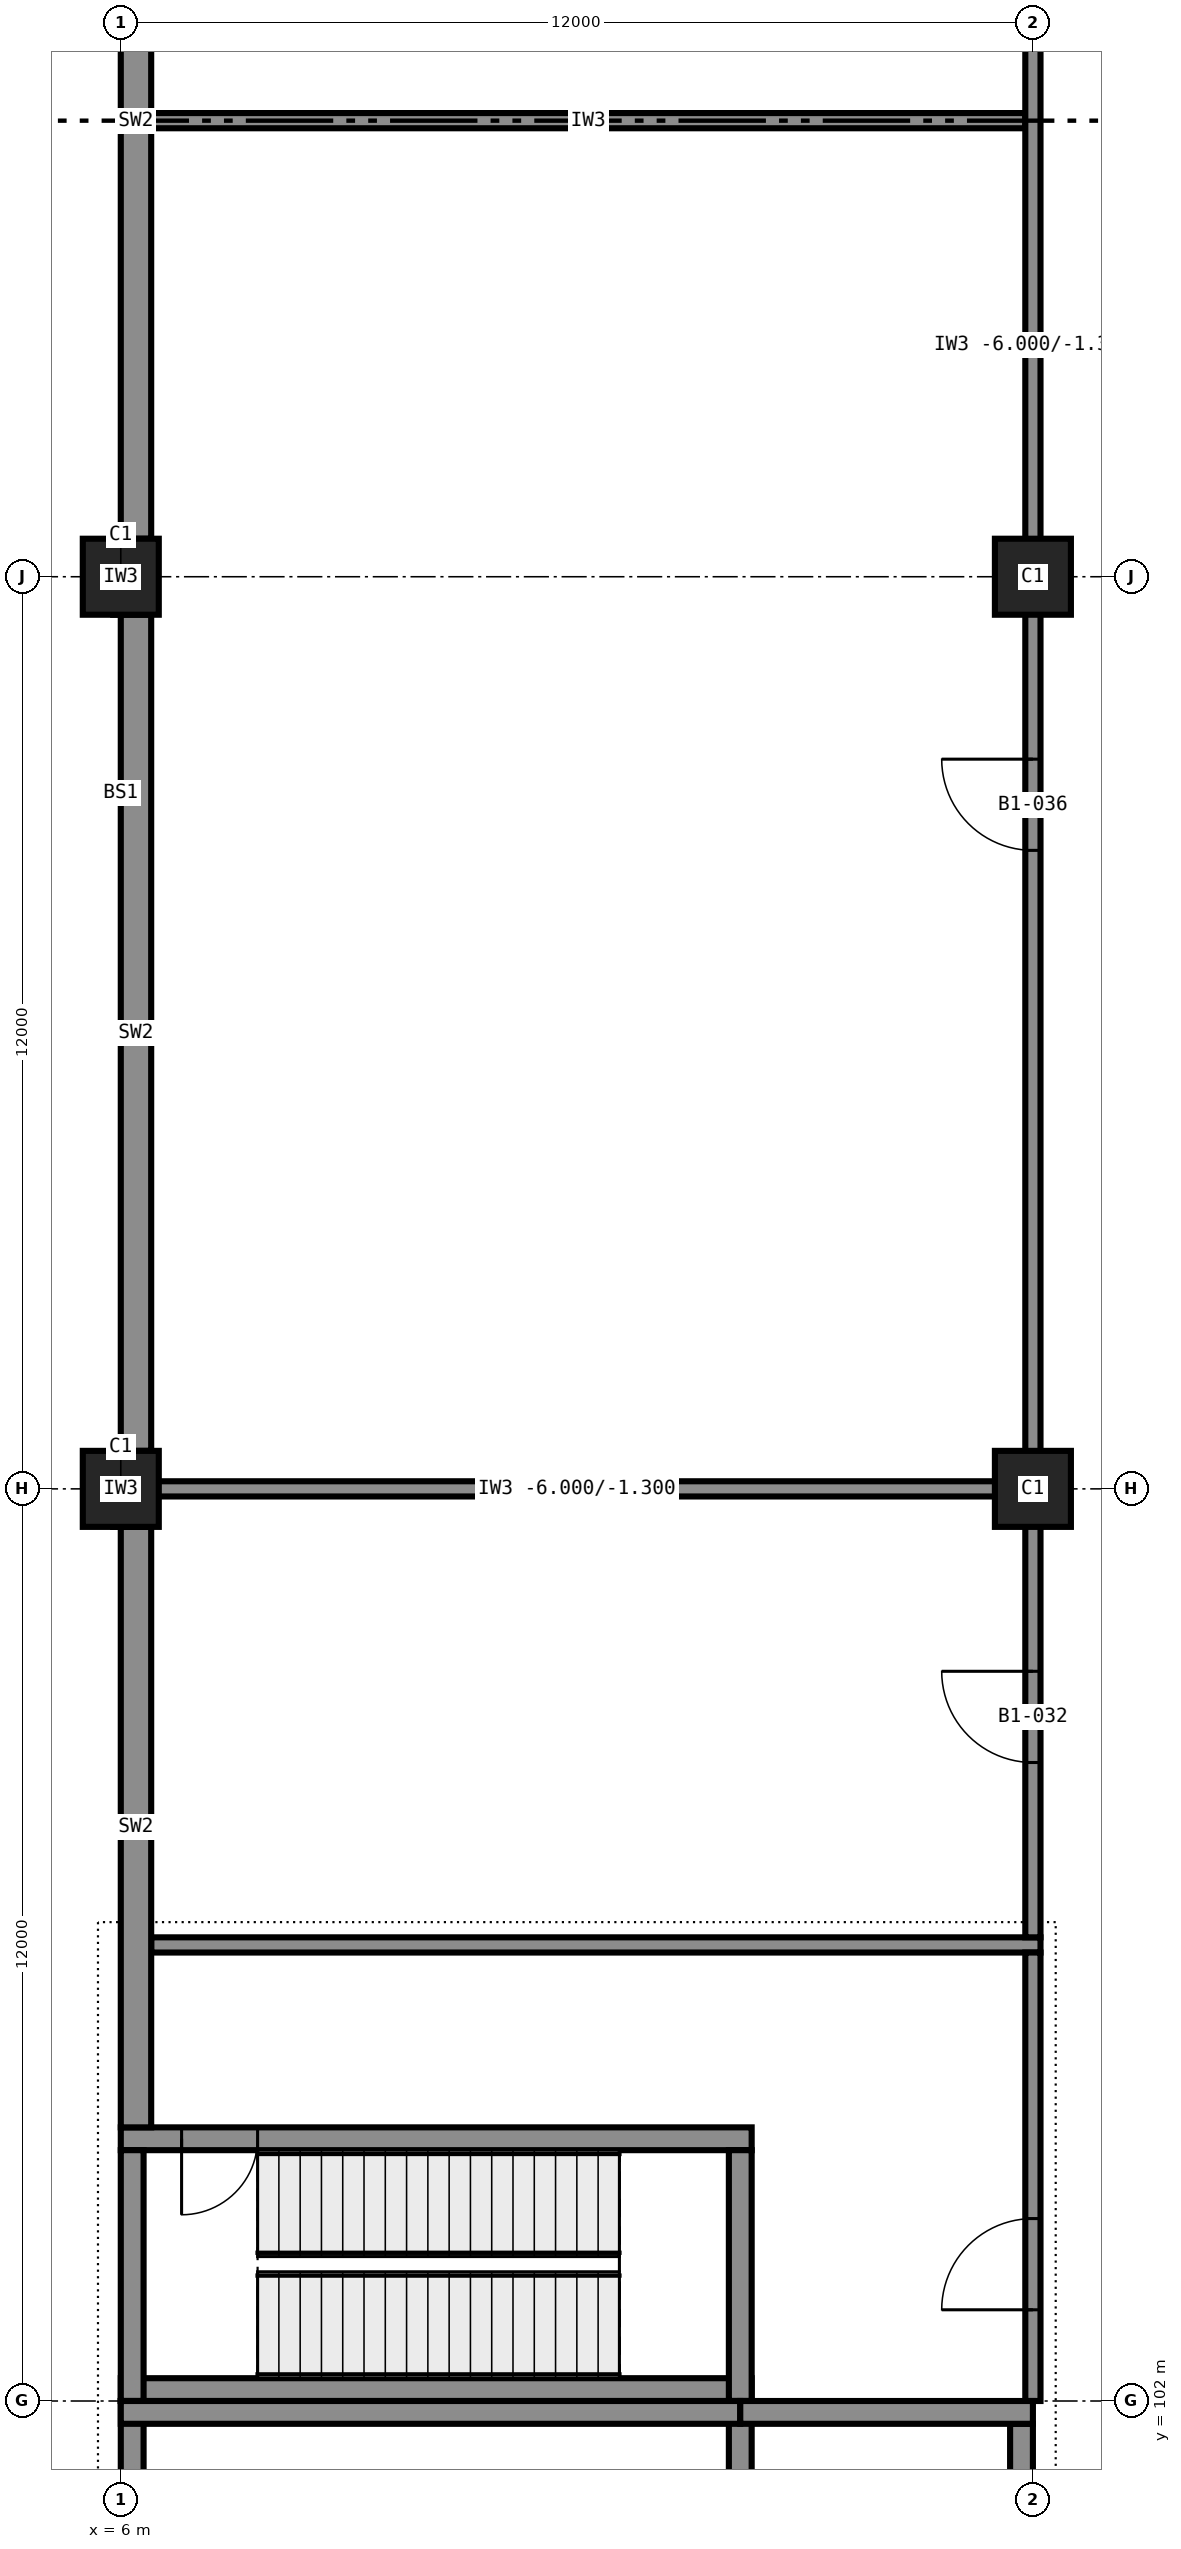
"""IFC4 building model, lengths in metres.
Left out: names, types, materials, properties, quantities, classifications, styles, units other than length and angle.
Written with IfcOpenShell. Run it as: python <this file> out.ifc"""

import sys

from ifc_helpers import new_model, si_unit, direction, frame, frame_2d, origin, origin_2d, place, context, subcontext, project, spatial, rectangle, extrude, element, fill, save


model = new_model("IFC4")
c1 = context("Model", 3, precision=1e-05, world=origin(), true_north=direction((0.0, 1.0)))
c2 = subcontext(c1, "Body", "Model", "MODEL_VIEW")
j1 = project(units=[si_unit("LENGTHUNIT", "METRE"), si_unit("PLANEANGLEUNIT", "RADIAN")], contexts=[c1])
p1 = place(None, origin())
s1 = spatial("IfcSite", under=j1, at=p1, CompositionType="ELEMENT")
p2 = place(p1, origin())
s2 = spatial("IfcBuilding", under=s1, at=p2, CompositionType="ELEMENT")
p3 = place(p2, frame((0.0, 0.0, -6.0)))
s3 = spatial("IfcBuildingStorey", under=s2, at=p3, CompositionType="ELEMENT", Elevation=-6.0)
for number, where, z_axis, x_axis in (
    (1, (6.0, 114.0, -0.4), (0.0, 0.0, 1.0), (1.0, 0.0, 0.0)),
    (2, (6.0, 126.0, -0.4), (0.0, 0.0, 1.0), (1.0, 0.0, 0.0)),
    (3, (18.0, 114.0, -0.4), (0.0, 0.0, 1.0), (1.0, 0.0, 0.0)),
    (4, (18.0, 126.0, -0.4), (0.0, 0.0, 1.0), (1.0, 0.0, 0.0)),
):
    element("IfcColumn", number, at=place(p3, frame(where, z_axis=z_axis, x_axis=x_axis)), inside=s3, PredefinedType="COLUMN", context=c2, shape_type="SweptSolid", body=[
        extrude(rectangle(XDim=1.0, YDim=1.0, at=origin_2d()), origin(), (0.0, 0.0, 1.0), 6.4),
    ])
p4 = place(p3, frame((6.0, 102.15, 0.0), z_axis=(0.0, 0.0, 1.0), x_axis=(1.0, 0.0, 0.0)))
e5 = element("IfcWall", 5, at=p4, inside=s3, PredefinedType="SHEAR", context=c2, shape_type="SweptSolid", body=[
    extrude(rectangle(XDim=8.3, YDim=0.3, at=frame_2d((4.15, 0.0))), origin(), (0.0, 0.0, 1.0), 5.7),
])
p5 = place(p3, frame((6.0, 105.45, 0.0), z_axis=(0.0, 0.0, 1.0), x_axis=(1.0, 0.0, 0.0)))
e6 = element("IfcWall", 6, at=p5, inside=s3, PredefinedType="SHEAR", context=c2, shape_type="SweptSolid", body=[
    extrude(rectangle(XDim=8.3, YDim=0.3, at=frame_2d((4.15, 0.0))), origin(), (0.0, 0.0, 1.0), 5.7),
])
p6 = place(p5, frame((0.8, 0.0, 0.0)))
e7 = element("IfcOpeningElement", 7, at=p6, cuts=e6, PredefinedType="OPENING", context=c2, shape_type="SweptSolid", body=[
    extrude(rectangle(XDim=1.0, YDim=2.1, at=frame_2d((0.5, 1.05))), frame((0.0, 0.16, 0.0), z_axis=(0.0, -1.0, 0.0), x_axis=(1.0, 0.0, 0.0)), (0.0, 0.0, 1.0), 0.32),
])
for number, where, z_axis, x_axis in (
    (8, (6.15, 102.0, 0.0), (0.0, 0.0, 1.0), (0.0, 1.0, 0.0)),
    (9, (14.15, 102.0, 0.0), (0.0, 0.0, 1.0), (0.0, 1.0, 0.0)),
):
    element("IfcWall", number, at=place(p3, frame(where, z_axis=z_axis, x_axis=x_axis)), inside=s3, PredefinedType="SHEAR", context=c2, shape_type="SweptSolid", body=[
        extrude(rectangle(XDim=3.3, YDim=0.3, at=frame_2d((1.65, 0.0))), origin(), (0.0, 0.0, 1.0), 5.7),
    ])
p7 = place(p3, frame((6.0, 101.85, 0.0), z_axis=(0.0, 0.0, 1.0), x_axis=(1.0, 0.0, 0.0)))
e10 = element("IfcWall", 10, at=p7, inside=s3, PredefinedType="SHEAR", context=c2, shape_type="SweptSolid", body=[
    extrude(rectangle(XDim=8.15, YDim=0.3, at=frame_2d((4.075, 0.0))), origin(), (0.0, 0.0, 1.0), 5.7),
])
p8 = place(p3, frame((14.15, 101.85, 0.0), z_axis=(0.0, 0.0, 1.0), x_axis=(1.0, 0.0, 0.0)))
e11 = element("IfcWall", 11, at=p8, inside=s3, PredefinedType="SHEAR", context=c2, shape_type="SweptSolid", body=[
    extrude(rectangle(XDim=3.85, YDim=0.3, at=frame_2d((1.925, 0.0))), origin(), (0.0, 0.0, 1.0), 5.7),
])
p9 = place(p3, frame((6.15, 98.55, 0.0), z_axis=(0.0, 0.0, 1.0), x_axis=(0.0, 1.0, 0.0)))
e12 = element("IfcWall", 12, at=p9, inside=s3, PredefinedType="SHEAR", context=c2, shape_type="SweptSolid", body=[
    extrude(rectangle(XDim=3.45, YDim=0.3, at=frame_2d((1.725, 0.0))), origin(), (0.0, 0.0, 1.0), 5.7),
])
p10 = place(p3, frame((17.85, 98.55, 0.0), z_axis=(0.0, 0.0, 1.0), x_axis=(0.0, 1.0, 0.0)))
e13 = element("IfcWall", 13, at=p10, inside=s3, PredefinedType="SHEAR", context=c2, shape_type="SweptSolid", body=[
    extrude(rectangle(XDim=3.15, YDim=0.3, at=frame_2d((1.575, 0.0))), origin(), (0.0, 0.0, 1.0), 5.7),
])
p11 = place(p10, frame((1.15, 0.0, 0.0)))
e14 = element("IfcOpeningElement", 14, at=p11, cuts=e13, PredefinedType="OPENING", context=c2, shape_type="SweptSolid", body=[
    extrude(rectangle(XDim=1.0, YDim=2.1, at=frame_2d((0.5, 1.05))), frame((0.0, 0.16, 0.0), z_axis=(0.0, -1.0, 0.0), x_axis=(1.0, 0.0, 0.0)), (0.0, 0.0, 1.0), 0.32),
])
p12 = place(p3, frame((14.15, 98.7, 0.0), z_axis=(0.0, 0.0, 1.0), x_axis=(0.0, 1.0, 0.0)))
e15 = element("IfcWall", 15, at=p12, inside=s3, PredefinedType="SHEAR", context=c2, shape_type="SweptSolid", body=[
    extrude(rectangle(XDim=3.3, YDim=0.3, at=frame_2d((1.65, 0.0))), origin(), (0.0, 0.0, 1.0), 5.7),
])
p13 = place(p3, frame((6.2, 105.6, 0.0), z_axis=(0.0, 0.0, 1.0), x_axis=(0.0, 1.0, 0.0)))
e16 = element("IfcWall", 16, at=p13, inside=s3, PredefinedType="SOLIDWALL", context=c2, shape_type="SweptSolid", body=[
    extrude(rectangle(XDim=7.9, YDim=0.4, at=frame_2d((3.95, 0.0))), origin(), (0.0, 0.0, 1.0), 5.7),
])
for number, where, z_axis, x_axis in (
    (17, (6.2, 114.5, 0.0), (0.0, 0.0, 1.0), (0.0, 1.0, 0.0)),
    (18, (6.2, 126.5, 0.0), (0.0, 0.0, 1.0), (0.0, 1.0, 0.0)),
):
    element("IfcWall", number, at=place(p3, frame(where, z_axis=z_axis, x_axis=x_axis)), inside=s3, PredefinedType="SOLIDWALL", context=c2, shape_type="SweptSolid", body=[
        extrude(rectangle(XDim=11.0, YDim=0.4, at=frame_2d((5.5, 0.0))), origin(), (0.0, 0.0, 1.0), 5.7),
    ])
p14 = place(p3, frame((6.4, 108.0, 0.0), z_axis=(0.0, 0.0, 1.0), x_axis=(1.0, 0.0, 0.0)))
e19 = element("IfcWall", 19, at=p14, inside=s3, PredefinedType="PARTITIONING", context=c2, shape_type="SweptSolid", body=[
    extrude(rectangle(XDim=11.7, YDim=0.2, at=frame_2d((5.85, 0.0))), origin(), (0.0, 0.0, 1.0), 5.7),
])
p15 = place(p3, frame((6.1, 114.0, 0.0), z_axis=(0.0, 0.0, 1.0), x_axis=(1.0, 0.0, 0.0)))
e20 = element("IfcWall", 20, at=p15, inside=s3, PredefinedType="PARTITIONING", context=c2, shape_type="SweptSolid", body=[
    extrude(rectangle(XDim=11.8, YDim=0.2, at=frame_2d((5.9, 0.0))), origin(), (0.0, 0.0, 1.0), 4.7),
])
p16 = place(p3, frame((6.4, 132.0, 0.0), z_axis=(0.0, 0.0, 1.0), x_axis=(1.0, 0.0, 0.0)))
e21 = element("IfcWall", 21, at=p16, inside=s3, PredefinedType="PARTITIONING", context=c2, shape_type="SweptSolid", body=[
    extrude(rectangle(XDim=11.5, YDim=0.2, at=frame_2d((5.75, 0.0))), origin(), (0.0, 0.0, 1.0), 5.7),
])
for number, where, z_axis, x_axis in (
    (22, (6.0, 113.5, 0.0), (0.0, 0.0, 1.0), (0.0, 1.0, 0.0)),
    (23, (6.0, 125.5, 0.0), (0.0, 0.0, 1.0), (0.0, 1.0, 0.0)),
):
    element("IfcWall", number, at=place(p3, frame(where, z_axis=z_axis, x_axis=x_axis)), inside=s3, PredefinedType="PARTITIONING", context=c2, shape_type="SweptSolid", body=[
        extrude(rectangle(XDim=1.0, YDim=0.2, at=frame_2d((0.5, 0.0))), origin(), (0.0, 0.0, 1.0), 5.7),
    ])
p17 = place(p3, frame((18.0, 102.0, 0.0), z_axis=(0.0, 0.0, 1.0), x_axis=(0.0, 1.0, 0.0)))
e24 = element("IfcWall", 24, at=p17, inside=s3, PredefinedType="PARTITIONING", context=c2, shape_type="SweptSolid", body=[
    extrude(rectangle(XDim=5.9, YDim=0.2, at=frame_2d((2.95, 0.0))), origin(), (0.0, 0.0, 1.0), 4.7),
])
p18 = place(p17, frame((1.2, 0.0, 0.0)))
e25 = element("IfcOpeningElement", 25, at=p18, cuts=e24, PredefinedType="OPENING", context=c2, shape_type="SweptSolid", body=[
    extrude(rectangle(XDim=1.2, YDim=2.1, at=frame_2d((0.6, 1.05))), frame((0.0, 0.11, 0.0), z_axis=(0.0, -1.0, 0.0), x_axis=(1.0, 0.0, 0.0)), (0.0, 0.0, 1.0), 0.22),
])
p19 = place(p3, frame((18.0, 108.1, 0.0), z_axis=(0.0, 0.0, 1.0), x_axis=(0.0, 1.0, 0.0)))
e26 = element("IfcWall", 26, at=p19, inside=s3, PredefinedType="PARTITIONING", context=c2, shape_type="SweptSolid", body=[
    extrude(rectangle(XDim=41.9, YDim=0.2, at=frame_2d((20.95, 0.0))), origin(), (0.0, 0.0, 1.0), 4.7),
])
p20 = place(p19, frame((2.3, 0.0, 0.0)))
e27 = element("IfcOpeningElement", 27, at=p20, cuts=e26, PredefinedType="OPENING", context=c2, shape_type="SweptSolid", body=[
    extrude(rectangle(XDim=1.2, YDim=2.1, at=frame_2d((0.6, 1.05))), frame((0.0, 0.11, 0.0), z_axis=(0.0, -1.0, 0.0), x_axis=(1.0, 0.0, 0.0)), (0.0, 0.0, 1.0), 0.22),
])
p21 = place(p19, frame((14.3, 0.0, 0.0)))
e28 = element("IfcOpeningElement", 28, at=p21, cuts=e26, PredefinedType="OPENING", context=c2, shape_type="SweptSolid", body=[
    extrude(rectangle(XDim=1.2, YDim=2.1, at=frame_2d((0.6, 1.05))), frame((0.0, 0.11, 0.0), z_axis=(0.0, -1.0, 0.0), x_axis=(1.0, 0.0, 0.0)), (0.0, 0.0, 1.0), 0.22),
])
p22 = place(p19, frame((32.3, 0.0, 0.0)))
e29 = element("IfcOpeningElement", 29, at=p22, cuts=e26, PredefinedType="OPENING", context=c2, shape_type="SweptSolid", body=[
    extrude(rectangle(XDim=1.2, YDim=2.1, at=frame_2d((0.6, 1.05))), frame((0.0, 0.11, 0.0), z_axis=(0.0, -1.0, 0.0), x_axis=(1.0, 0.0, 0.0)), (0.0, 0.0, 1.0), 0.22),
])
p23 = place(p18, origin())
e30 = element("IfcDoor", 30, at=p23, inside=s3, OperationType="SINGLE_SWING_RIGHT", PredefinedType="DOOR", context=c2, shape_type="SweptSolid", body=[
    extrude(rectangle(XDim=1.2, YDim=2.1, at=frame_2d((0.6, 1.05))), frame((0.0, 0.025, 0.0), z_axis=(0.0, -1.0, 0.0), x_axis=(1.0, 0.0, 0.0)), (0.0, 0.0, 1.0), 0.05),
])
fill(e25, e30)
p24 = place(p6, frame((1.0, 0.0, 0.0), z_axis=(0.0, 0.0, 1.0), x_axis=(-1.0, 0.0, 0.0)))
e31 = element("IfcDoor", 31, at=p24, inside=s3, OperationType="SINGLE_SWING_LEFT", PredefinedType="DOOR", context=c2, shape_type="SweptSolid", body=[
    extrude(rectangle(XDim=1.0, YDim=2.1, at=frame_2d((0.5, 1.05))), frame((0.0, 0.025, 0.0), z_axis=(0.0, -1.0, 0.0), x_axis=(1.0, 0.0, 0.0)), (0.0, 0.0, 1.0), 0.05),
])
fill(e7, e31)
p25 = place(p20, origin())
e32 = element("IfcDoor", 32, at=p25, inside=s3, OperationType="SINGLE_SWING_LEFT", PredefinedType="DOOR", context=c2, shape_type="SweptSolid", body=[
    extrude(rectangle(XDim=1.2, YDim=2.1, at=frame_2d((0.6, 1.05))), frame((0.0, 0.025, 0.0), z_axis=(0.0, -1.0, 0.0), x_axis=(1.0, 0.0, 0.0)), (0.0, 0.0, 1.0), 0.05),
])
fill(e27, e32)
p26 = place(p21, origin())
e33 = element("IfcDoor", 33, at=p26, inside=s3, OperationType="SINGLE_SWING_LEFT", PredefinedType="DOOR", context=c2, shape_type="SweptSolid", body=[
    extrude(rectangle(XDim=1.2, YDim=2.1, at=frame_2d((0.6, 1.05))), frame((0.0, 0.025, 0.0), z_axis=(0.0, -1.0, 0.0), x_axis=(1.0, 0.0, 0.0)), (0.0, 0.0, 1.0), 0.05),
])
fill(e28, e33)
save(model, sys.argv[1])
